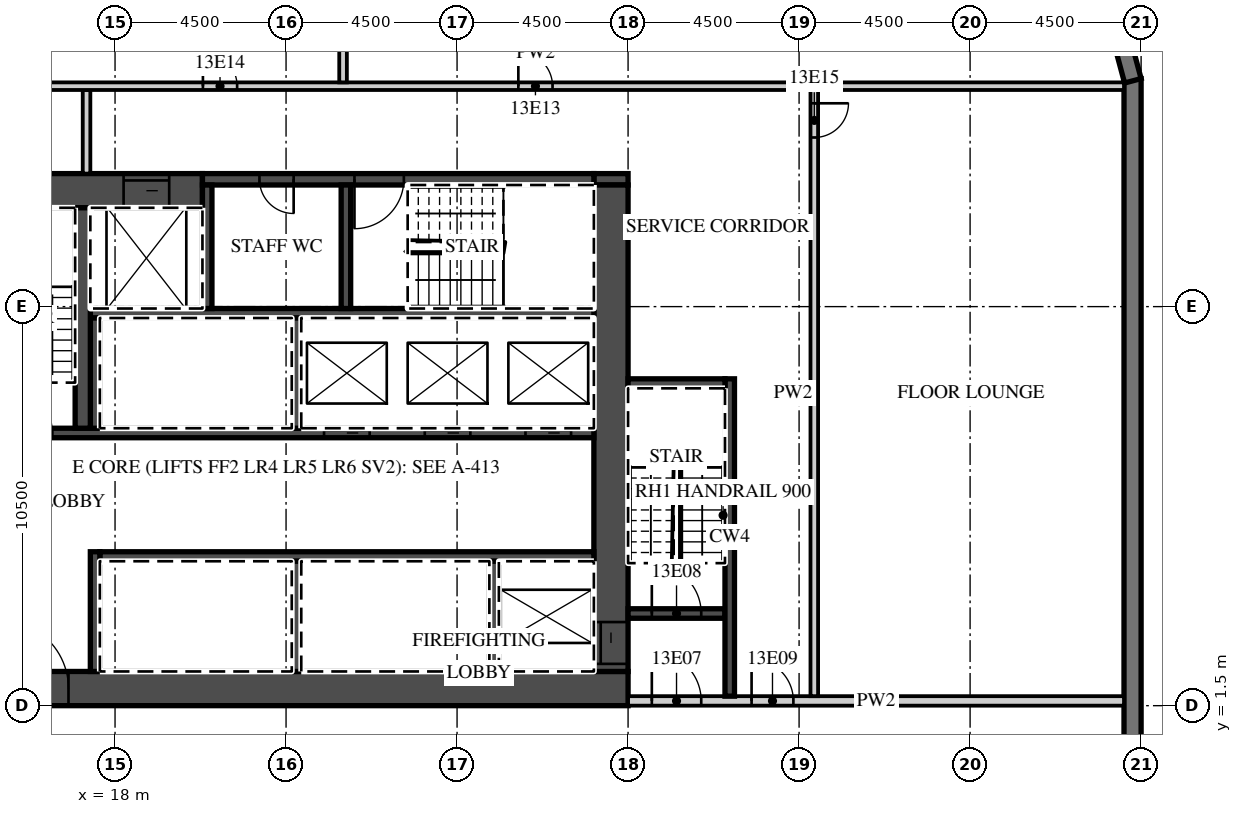
"""IFC4 building model, lengths in metres.
Left out: names, types, materials, properties, quantities, classifications, styles, units other than length and angle.
Written with IfcOpenShell. Run it as: python <this file> out.ifc"""

import sys

from ifc_helpers import new_model, si_unit, direction, frame, frame_2d, origin, place, context, subcontext, project, spatial, polyline, rectangle, outline, extrude, element, fill, save


model = new_model("IFC4")
c1 = context("Model", 3, precision=1e-05, world=origin(), true_north=direction((0.0, 1.0)))
c2 = subcontext(c1, "Body", "Model", "MODEL_VIEW")
j1 = project(units=[si_unit("LENGTHUNIT", "METRE"), si_unit("PLANEANGLEUNIT", "RADIAN")], contexts=[c1])
p1 = place(None, origin())
s1 = spatial("IfcSite", under=j1, at=p1, CompositionType="ELEMENT")
p2 = place(p1, origin())
s2 = spatial("IfcBuilding", under=s1, at=p2, CompositionType="ELEMENT")
p3 = place(p2, frame((0.0, 0.0, 73.2)))
s3 = spatial("IfcBuildingStorey", under=s2, at=p3, CompositionType="ELEMENT", Elevation=73.2)
p4 = place(p3, frame((44.775, -18.0, 0.0), z_axis=(0.0, 0.0, 1.0), x_axis=(0.0, 1.0, 0.0)))
e1 = element("IfcWall", 1, at=p4, inside=s3, PredefinedType="SOLIDWALL", context=c2, shape_type="SweptSolid", body=[
    extrude(rectangle(XDim=36.0, YDim=0.45, at=frame_2d((18.0, 0.0))), origin(), (0.0, 0.0, 1.0), 3.02),
])
p5 = place(p4, frame((3.9, 0.0, 0.45)))
e2 = element("IfcOpeningElement", 2, at=p5, cuts=e1, PredefinedType="OPENING", context=c2, shape_type="SweptSolid", body=[
    extrude(rectangle(XDim=3.3, YDim=2.25, at=frame_2d((1.65, 1.125))), frame((0.0, 0.235, 0.0), z_axis=(0.0, -1.0, 0.0), x_axis=(1.0, 0.0, 0.0)), (0.0, 0.0, 1.0), 0.47),
])
p6 = place(p4, frame((8.4, 0.0, 0.45)))
e3 = element("IfcOpeningElement", 3, at=p6, cuts=e1, PredefinedType="OPENING", context=c2, shape_type="SweptSolid", body=[
    extrude(rectangle(XDim=3.3, YDim=2.25, at=frame_2d((1.65, 1.125))), frame((0.0, 0.235, 0.0), z_axis=(0.0, -1.0, 0.0), x_axis=(1.0, 0.0, 0.0)), (0.0, 0.0, 1.0), 0.47),
])
p7 = place(p4, frame((12.9, 0.0, 0.45)))
e4 = element("IfcOpeningElement", 4, at=p7, cuts=e1, PredefinedType="OPENING", context=c2, shape_type="SweptSolid", body=[
    extrude(rectangle(XDim=3.3, YDim=2.25, at=frame_2d((1.65, 1.125))), frame((0.0, 0.235, 0.0), z_axis=(0.0, -1.0, 0.0), x_axis=(1.0, 0.0, 0.0)), (0.0, 0.0, 1.0), 0.47),
])
p8 = place(p3, frame((44.783, 17.942, 0.0), z_axis=(0.0, 0.0, 1.0), x_axis=(-0.25881466832, 0.965926999034, 0.0)))
e5 = element("IfcWall", 5, at=p8, inside=s3, PredefinedType="SOLIDWALL", context=c2, shape_type="SweptSolid", body=[
    extrude(outline(polyline([(0.0, -0.225), (2.071, -0.225), (1.95, 0.225), (0.121, 0.225), (0.0, -0.225)])), origin(), (0.0, 0.0, 1.0), 3.02),
])
p9 = place(p3, frame((13.5, 1.95, 0.0), z_axis=(0.0, 0.0, 1.0), x_axis=(1.0, 0.0, 0.0)))
e6 = element("IfcWall", 6, at=p9, inside=s3, PredefinedType="SHEAR", context=c2, shape_type="SweptSolid", body=[
    extrude(rectangle(XDim=18.0, YDim=0.9, at=frame_2d((9.0, 0.0))), origin(), (0.0, 0.0, 1.0), 3.02),
])
p10 = place(p9, frame((1.475, 0.0, 0.0)))
e7 = element("IfcOpeningElement", 7, at=p10, cuts=e6, PredefinedType="OPENING", context=c2, shape_type="SweptSolid", body=[
    extrude(rectangle(XDim=1.8, YDim=2.1, at=frame_2d((0.9, 1.05))), frame((0.0, 0.46, 0.0), z_axis=(0.0, -1.0, 0.0), x_axis=(1.0, 0.0, 0.0)), (0.0, 0.0, 1.0), 0.92),
])
p11 = place(p3, frame((13.5, 15.05, 0.0), z_axis=(0.0, 0.0, 1.0), x_axis=(1.0, 0.0, 0.0)))
e8 = element("IfcWall", 8, at=p11, inside=s3, PredefinedType="SHEAR", context=c2, shape_type="SweptSolid", body=[
    extrude(rectangle(XDim=6.8, YDim=0.9, at=frame_2d((3.4, 0.0))), origin(), (0.0, 0.0, 1.0), 3.02),
])
p12 = place(p11, frame((4.725, 0.0, 0.0)))
e9 = element("IfcOpeningElement", 9, at=p12, cuts=e8, PredefinedType="OPENING", context=c2, shape_type="SweptSolid", body=[
    extrude(rectangle(XDim=1.2, YDim=2.1, at=frame_2d((0.6, 1.05))), frame((0.0, 0.46, 0.0), z_axis=(0.0, -1.0, 0.0), x_axis=(1.0, 0.0, 0.0)), (0.0, 0.0, 1.0), 0.92),
])
p13 = place(p3, frame((30.6, 15.35, 0.0), z_axis=(0.0, 0.0, 1.0), x_axis=(1.0, 0.0, 0.0)))
e10 = element("IfcWall", 10, at=p13, inside=s3, PredefinedType="SHEAR", context=c2, shape_type="SweptSolid", body=[
    extrude(rectangle(XDim=0.9, YDim=0.3, at=frame_2d((0.45, 0.0))), origin(), (0.0, 0.0, 1.0), 3.02),
])
p14 = place(p3, frame((20.3, 15.35, 0.0), z_axis=(0.0, 0.0, 1.0), x_axis=(1.0, 0.0, 0.0)))
e11 = element("IfcWall", 11, at=p14, inside=s3, PredefinedType="SHEAR", context=c2, shape_type="SweptSolid", body=[
    extrude(rectangle(XDim=10.3, YDim=0.3, at=frame_2d((5.15, 0.0))), origin(), (0.0, 0.0, 1.0), 3.02),
])
p15 = place(p14, frame((4.0, 0.0, 0.0)))
e12 = element("IfcOpeningElement", 12, at=p15, cuts=e11, PredefinedType="OPENING", context=c2, shape_type="SweptSolid", body=[
    extrude(rectangle(XDim=1.3, YDim=2.1, at=frame_2d((0.65, 1.05))), frame((0.0, 0.16, 0.0), z_axis=(0.0, -1.0, 0.0), x_axis=(1.0, 0.0, 0.0)), (0.0, 0.0, 1.0), 0.32),
])
p16 = place(p14, frame((1.5, 0.0, 0.0)))
e13 = element("IfcOpeningElement", 13, at=p16, cuts=e11, PredefinedType="OPENING", context=c2, shape_type="SweptSolid", body=[
    extrude(rectangle(XDim=0.9, YDim=2.1, at=frame_2d((0.45, 1.05))), frame((0.0, 0.16, 0.0), z_axis=(0.0, -1.0, 0.0), x_axis=(1.0, 0.0, 0.0)), (0.0, 0.0, 1.0), 0.32),
])
p17 = place(p3, frame((31.05, 2.4, 0.0), z_axis=(0.0, 0.0, 1.0), x_axis=(0.0, 1.0, 0.0)))
e14 = element("IfcWall", 14, at=p17, inside=s3, PredefinedType="SHEAR", context=c2, shape_type="SweptSolid", body=[
    extrude(rectangle(XDim=12.8, YDim=0.9, at=frame_2d((6.4, 0.0))), origin(), (0.0, 0.0, 1.0), 3.02),
])
p18 = place(p17, frame((0.2, 0.0, 0.0)))
e15 = element("IfcOpeningElement", 15, at=p18, cuts=e14, PredefinedType="OPENING", context=c2, shape_type="SweptSolid", body=[
    extrude(rectangle(XDim=1.1, YDim=2.1, at=frame_2d((0.55, 1.05))), frame((0.0, 0.46, 0.0), z_axis=(0.0, -1.0, 0.0), x_axis=(1.0, 0.0, 0.0)), (0.0, 0.0, 1.0), 0.92),
])
p19 = place(p3, frame((17.6, 5.425, 0.0), z_axis=(0.0, 0.0, 1.0), x_axis=(1.0, 0.0, 0.0)))
e16 = element("IfcWall", 16, at=p19, inside=s3, PredefinedType="SHEAR", context=c2, shape_type="SweptSolid", body=[
    extrude(rectangle(XDim=13.0, YDim=0.25, at=frame_2d((6.5, 0.0))), origin(), (0.0, 0.0, 1.0), 3.02),
])
p20 = place(p3, frame((17.475, 2.4, 0.0), z_axis=(0.0, 0.0, 1.0), x_axis=(0.0, 1.0, 0.0)))
e17 = element("IfcWall", 17, at=p20, inside=s3, PredefinedType="SHEAR", context=c2, shape_type="SweptSolid", body=[
    extrude(rectangle(XDim=3.15, YDim=0.25, at=frame_2d((1.575, 0.0))), origin(), (0.0, 0.0, 1.0), 3.02),
])
for number, where, z_axis, x_axis in (
    (18, (27.975, 2.4, 0.0), (0.0, 0.0, 1.0), (0.0, 1.0, 0.0)),
    (19, (22.775, 2.4, 0.0), (0.0, 0.0, 1.0), (0.0, 1.0, 0.0)),
):
    element("IfcWall", number, at=place(p3, frame(where, z_axis=z_axis, x_axis=x_axis)), inside=s3, PredefinedType="SHEAR", context=c2, shape_type="SweptSolid", body=[
        extrude(rectangle(XDim=2.9, YDim=0.25, at=frame_2d((1.45, 0.0))), origin(), (0.0, 0.0, 1.0), 3.02),
    ])
p21 = place(p3, frame((14.4, 8.675, 0.0), z_axis=(0.0, 0.0, 1.0), x_axis=(1.0, 0.0, 0.0)))
e20 = element("IfcWall", 20, at=p21, inside=s3, PredefinedType="SHEAR", context=c2, shape_type="SweptSolid", body=[
    extrude(rectangle(XDim=16.2, YDim=0.25, at=frame_2d((8.1, 0.0))), origin(), (0.0, 0.0, 1.0), 3.02),
])
p22 = place(p21, frame((14.4, 0.0, 0.0)))
e21 = element("IfcOpeningElement", 21, at=p22, cuts=e20, PredefinedType="OPENING", context=c2, shape_type="SweptSolid", body=[
    extrude(rectangle(XDim=1.2, YDim=2.1, at=frame_2d((0.6, 1.05))), frame((0.0, 0.135, 0.0), z_axis=(0.0, -1.0, 0.0), x_axis=(1.0, 0.0, 0.0)), (0.0, 0.0, 1.0), 0.27),
])
p23 = place(p21, frame((11.75, 0.0, 0.0)))
e22 = element("IfcOpeningElement", 22, at=p23, cuts=e20, PredefinedType="OPENING", context=c2, shape_type="SweptSolid", body=[
    extrude(rectangle(XDim=1.2, YDim=2.1, at=frame_2d((0.6, 1.05))), frame((0.0, 0.135, 0.0), z_axis=(0.0, -1.0, 0.0), x_axis=(1.0, 0.0, 0.0)), (0.0, 0.0, 1.0), 0.27),
])
p24 = place(p21, frame((9.1, 0.0, 0.0)))
e23 = element("IfcOpeningElement", 23, at=p24, cuts=e20, PredefinedType="OPENING", context=c2, shape_type="SweptSolid", body=[
    extrude(rectangle(XDim=1.2, YDim=2.1, at=frame_2d((0.6, 1.05))), frame((0.0, 0.135, 0.0), z_axis=(0.0, -1.0, 0.0), x_axis=(1.0, 0.0, 0.0)), (0.0, 0.0, 1.0), 0.27),
])
p25 = place(p21, frame((0.65, 0.0, 0.0)))
e24 = element("IfcOpeningElement", 24, at=p25, cuts=e20, PredefinedType="OPENING", context=c2, shape_type="SweptSolid", body=[
    extrude(rectangle(XDim=1.3, YDim=2.1, at=frame_2d((0.65, 1.05))), frame((0.0, 0.135, 0.0), z_axis=(0.0, -1.0, 0.0), x_axis=(1.0, 0.0, 0.0)), (0.0, 0.0, 1.0), 0.27),
])
p26 = place(p3, frame((17.35, 11.825, 0.0), z_axis=(0.0, 0.0, 1.0), x_axis=(1.0, 0.0, 0.0)))
e25 = element("IfcWall", 25, at=p26, inside=s3, PredefinedType="SHEAR", context=c2, shape_type="SweptSolid", body=[
    extrude(rectangle(XDim=13.25, YDim=0.25, at=frame_2d((6.625, 0.0))), origin(), (0.0, 0.0, 1.0), 3.02),
])
for number, where, z_axis, x_axis in (
    (26, (17.475, 8.8, 0.0), (0.0, 0.0, 1.0), (0.0, 1.0, 0.0)),
    (27, (22.775, 8.8, 0.0), (0.0, 0.0, 1.0), (0.0, 1.0, 0.0)),
):
    element("IfcWall", number, at=place(p3, frame(where, z_axis=z_axis, x_axis=x_axis)), inside=s3, PredefinedType="SHEAR", context=c2, shape_type="SweptSolid", body=[
        extrude(rectangle(XDim=2.9, YDim=0.25, at=frame_2d((1.45, 0.0))), origin(), (0.0, 0.0, 1.0), 3.02),
    ])
p27 = place(p3, frame((17.15, 8.8, 0.0), z_axis=(0.0, 0.0, 1.0), x_axis=(0.0, 1.0, 0.0)))
e28 = element("IfcWall", 28, at=p27, inside=s3, PredefinedType="SHEAR", context=c2, shape_type="SweptSolid", body=[
    extrude(rectangle(XDim=5.8, YDim=0.4, at=frame_2d((2.9, 0.0))), origin(), (0.0, 0.0, 1.0), 3.02),
])
for number, where, z_axis, x_axis in (
    (29, (20.425, 11.95, 0.0), (0.0, 0.0, 1.0), (0.0, 1.0, 0.0)),
    (30, (24.075, 11.95, 0.0), (0.0, 0.0, 1.0), (0.0, 1.0, 0.0)),
):
    element("IfcWall", number, at=place(p3, frame(where, z_axis=z_axis, x_axis=x_axis)), inside=s3, PredefinedType="SHEAR", context=c2, shape_type="SweptSolid", body=[
        extrude(rectangle(XDim=3.25, YDim=0.25, at=frame_2d((1.625, 0.0))), origin(), (0.0, 0.0, 1.0), 3.02),
    ])
p28 = place(p3, frame((31.5, 1.625, 0.0), z_axis=(0.0, 0.0, 1.0), x_axis=(1.0, 0.0, 0.0)))
e31 = element("IfcWall", 31, at=p28, inside=s3, PredefinedType="PARTITIONING", context=c2, shape_type="SweptSolid", body=[
    extrude(rectangle(XDim=13.05, YDim=0.25, at=frame_2d((6.525, 0.0))), origin(), (0.0, 0.0, 1.0), 3.02),
])
p29 = place(p28, frame((0.625, 0.0, 0.0)))
e32 = element("IfcOpeningElement", 32, at=p29, cuts=e31, PredefinedType="OPENING", context=c2, shape_type="SweptSolid", body=[
    extrude(rectangle(XDim=1.3, YDim=2.1, at=frame_2d((0.65, 1.05))), frame((0.0, 0.135, 0.0), z_axis=(0.0, -1.0, 0.0), x_axis=(1.0, 0.0, 0.0)), (0.0, 0.0, 1.0), 0.27),
])
p30 = place(p28, frame((3.25, 0.0, 0.0)))
e33 = element("IfcOpeningElement", 33, at=p30, cuts=e31, PredefinedType="OPENING", context=c2, shape_type="SweptSolid", body=[
    extrude(rectangle(XDim=1.1, YDim=2.1, at=frame_2d((0.55, 1.05))), frame((0.0, 0.135, 0.0), z_axis=(0.0, -1.0, 0.0), x_axis=(1.0, 0.0, 0.0)), (0.0, 0.0, 1.0), 0.27),
])
p31 = place(p3, frame((31.5, 3.925, 0.0), z_axis=(0.0, 0.0, 1.0), x_axis=(1.0, 0.0, 0.0)))
e34 = element("IfcWall", 34, at=p31, inside=s3, PredefinedType="SHEAR", context=c2, shape_type="SweptSolid", body=[
    extrude(rectangle(XDim=2.55, YDim=0.25, at=frame_2d((1.275, 0.0))), origin(), (0.0, 0.0, 1.0), 3.02),
])
p32 = place(p31, frame((0.625, 0.0, 0.0)))
e35 = element("IfcOpeningElement", 35, at=p32, cuts=e34, PredefinedType="OPENING", context=c2, shape_type="SweptSolid", body=[
    extrude(rectangle(XDim=1.3, YDim=2.1, at=frame_2d((0.65, 1.05))), frame((0.0, 0.135, 0.0), z_axis=(0.0, -1.0, 0.0), x_axis=(1.0, 0.0, 0.0)), (0.0, 0.0, 1.0), 0.27),
])
p33 = place(p3, frame((34.175, 1.75, 0.0), z_axis=(0.0, 0.0, 1.0), x_axis=(0.0, 1.0, 0.0)))
e36 = element("IfcWall", 36, at=p33, inside=s3, PredefinedType="SHEAR", context=c2, shape_type="SweptSolid", body=[
    extrude(rectangle(XDim=8.35, YDim=0.25, at=frame_2d((4.175, 0.0))), origin(), (0.0, 0.0, 1.0), 3.02),
])
p34 = place(p3, frame((31.5, 9.975, 0.0), z_axis=(0.0, 0.0, 1.0), x_axis=(1.0, 0.0, 0.0)))
e37 = element("IfcWall", 37, at=p34, inside=s3, PredefinedType="SHEAR", context=c2, shape_type="SweptSolid", body=[
    extrude(rectangle(XDim=2.55, YDim=0.25, at=frame_2d((1.275, 0.0))), origin(), (0.0, 0.0, 1.0), 3.02),
])
p35 = place(p3, frame((17.25, 15.5, 0.0), z_axis=(0.0, 0.0, 1.0), x_axis=(0.0, 1.0, 0.0)))
e38 = element("IfcWall", 38, at=p35, inside=s3, PredefinedType="PARTITIONING", context=c2, shape_type="SweptSolid", body=[
    extrude(rectangle(XDim=2.2, YDim=0.2, at=frame_2d((1.1, 0.0))), origin(), (0.0, 0.0, 1.0), 3.02),
])
p36 = place(p3, frame((36.4, 1.75, 0.0), z_axis=(0.0, 0.0, 1.0), x_axis=(0.0, 1.0, 0.0)))
e39 = element("IfcWall", 39, at=p36, inside=s3, PredefinedType="PARTITIONING", context=c2, shape_type="SweptSolid", body=[
    extrude(rectangle(XDim=15.95, YDim=0.2, at=frame_2d((7.975, 0.0))), origin(), (0.0, 0.0, 1.0), 3.02),
])
p37 = place(p36, frame((14.7, 0.0, 0.0)))
e40 = element("IfcOpeningElement", 40, at=p37, cuts=e39, PredefinedType="OPENING", context=c2, shape_type="SweptSolid", body=[
    extrude(rectangle(XDim=0.9, YDim=2.1, at=frame_2d((0.45, 1.05))), frame((0.0, 0.11, 0.0), z_axis=(0.0, -1.0, 0.0), x_axis=(1.0, 0.0, 0.0)), (0.0, 0.0, 1.0), 0.22),
])
p38 = place(p3, frame((13.6, 17.8, 0.0), z_axis=(0.0, 0.0, 1.0), x_axis=(1.0, 0.0, 0.0)))
e41 = element("IfcWall", 41, at=p38, inside=s3, PredefinedType="PARTITIONING", context=c2, shape_type="SweptSolid", body=[
    extrude(rectangle(XDim=30.95, YDim=0.2, at=frame_2d((15.475, 0.0))), origin(), (0.0, 0.0, 1.0), 3.02),
])
p39 = place(p38, frame((15.012, 0.0, 0.0)))
e42 = element("IfcOpeningElement", 42, at=p39, cuts=e41, PredefinedType="OPENING", context=c2, shape_type="SweptSolid", body=[
    extrude(rectangle(XDim=0.9, YDim=2.1, at=frame_2d((0.45, 1.05))), frame((0.0, 0.11, 0.0), z_axis=(0.0, -1.0, 0.0), x_axis=(1.0, 0.0, 0.0)), (0.0, 0.0, 1.0), 0.22),
])
p40 = place(p38, frame((6.712, 0.0, 0.0)))
e43 = element("IfcOpeningElement", 43, at=p40, cuts=e41, PredefinedType="OPENING", context=c2, shape_type="SweptSolid", body=[
    extrude(rectangle(XDim=0.9, YDim=2.1, at=frame_2d((0.45, 1.05))), frame((0.0, 0.11, 0.0), z_axis=(0.0, -1.0, 0.0), x_axis=(1.0, 0.0, 0.0)), (0.0, 0.0, 1.0), 0.22),
])
p41 = place(p3, frame((24.0, 17.9, 0.0), z_axis=(0.0, 0.0, 1.0), x_axis=(0.0, 1.0, 0.0)))
e44 = element("IfcWall", 44, at=p41, inside=s3, PredefinedType="PARTITIONING", context=c2, shape_type="SweptSolid", body=[
    extrude(rectangle(XDim=3.65, YDim=0.2, at=frame_2d((1.825, 0.0))), origin(), (0.0, 0.0, 1.0), 3.02),
])
p42 = place(p22, origin())
e45 = element("IfcDoor", 45, at=p42, inside=s3, OperationType="SLIDING_TO_LEFT", PredefinedType="DOOR", context=c2, shape_type="SweptSolid", body=[
    extrude(rectangle(XDim=1.2, YDim=2.1, at=frame_2d((0.6, 1.05))), frame((0.0, 0.025, 0.0), z_axis=(0.0, -1.0, 0.0), x_axis=(1.0, 0.0, 0.0)), (0.0, 0.0, 1.0), 0.05),
])
fill(e21, e45)
p43 = place(p23, origin())
e46 = element("IfcDoor", 46, at=p43, inside=s3, OperationType="SLIDING_TO_RIGHT", PredefinedType="DOOR", context=c2, shape_type="SweptSolid", body=[
    extrude(rectangle(XDim=1.2, YDim=2.1, at=frame_2d((0.6, 1.05))), frame((0.0, 0.025, 0.0), z_axis=(0.0, -1.0, 0.0), x_axis=(1.0, 0.0, 0.0)), (0.0, 0.0, 1.0), 0.05),
])
fill(e22, e46)
p44 = place(p24, origin())
e47 = element("IfcDoor", 47, at=p44, inside=s3, OperationType="SLIDING_TO_RIGHT", PredefinedType="DOOR", context=c2, shape_type="SweptSolid", body=[
    extrude(rectangle(XDim=1.2, YDim=2.1, at=frame_2d((0.6, 1.05))), frame((0.0, 0.025, 0.0), z_axis=(0.0, -1.0, 0.0), x_axis=(1.0, 0.0, 0.0)), (0.0, 0.0, 1.0), 0.05),
])
fill(e23, e47)
p45 = place(p12, origin())
e48 = element("IfcDoor", 48, at=p45, inside=s3, OperationType="SLIDING_TO_LEFT", PredefinedType="DOOR", context=c2, shape_type="SweptSolid", body=[
    extrude(rectangle(XDim=1.2, YDim=2.1, at=frame_2d((0.6, 1.05))), frame((0.0, 0.025, 0.0), z_axis=(0.0, -1.0, 0.0), x_axis=(1.0, 0.0, 0.0)), (0.0, 0.0, 1.0), 0.05),
])
fill(e9, e48)
p46 = place(p18, origin())
e49 = element("IfcDoor", 49, at=p46, inside=s3, OperationType="SLIDING_TO_LEFT", PredefinedType="DOOR", context=c2, shape_type="SweptSolid", body=[
    extrude(rectangle(XDim=1.1, YDim=2.1, at=frame_2d((0.55, 1.05))), frame((0.0, 0.025, 0.0), z_axis=(0.0, -1.0, 0.0), x_axis=(1.0, 0.0, 0.0)), (0.0, 0.0, 1.0), 0.05),
])
fill(e15, e49)
p47 = place(p10, origin())
e50 = element("IfcDoor", 50, at=p47, inside=s3, OperationType="DOUBLE_DOOR_DOUBLE_SWING", PredefinedType="DOOR", context=c2, shape_type="SweptSolid", body=[
    extrude(rectangle(XDim=1.8, YDim=2.1, at=frame_2d((0.9, 1.05))), frame((0.0, 0.025, 0.0), z_axis=(0.0, -1.0, 0.0), x_axis=(1.0, 0.0, 0.0)), (0.0, 0.0, 1.0), 0.05),
])
fill(e7, e50)
p48 = place(p29, origin())
e51 = element("IfcDoor", 51, at=p48, inside=s3, OperationType="SINGLE_SWING_LEFT", PredefinedType="DOOR", context=c2, shape_type="SweptSolid", body=[
    extrude(rectangle(XDim=1.3, YDim=2.1, at=frame_2d((0.65, 1.05))), frame((0.0, 0.025, 0.0), z_axis=(0.0, -1.0, 0.0), x_axis=(1.0, 0.0, 0.0)), (0.0, 0.0, 1.0), 0.05),
])
fill(e32, e51)
p49 = place(p32, origin())
e52 = element("IfcDoor", 52, at=p49, inside=s3, OperationType="SINGLE_SWING_LEFT", PredefinedType="DOOR", context=c2, shape_type="SweptSolid", body=[
    extrude(rectangle(XDim=1.3, YDim=2.1, at=frame_2d((0.65, 1.05))), frame((0.0, 0.025, 0.0), z_axis=(0.0, -1.0, 0.0), x_axis=(1.0, 0.0, 0.0)), (0.0, 0.0, 1.0), 0.05),
])
fill(e35, e52)
p50 = place(p30, origin())
e53 = element("IfcDoor", 53, at=p50, inside=s3, OperationType="SINGLE_SWING_LEFT", PredefinedType="DOOR", context=c2, shape_type="SweptSolid", body=[
    extrude(rectangle(XDim=1.1, YDim=2.1, at=frame_2d((0.55, 1.05))), frame((0.0, 0.025, 0.0), z_axis=(0.0, -1.0, 0.0), x_axis=(1.0, 0.0, 0.0)), (0.0, 0.0, 1.0), 0.05),
])
fill(e33, e53)
p51 = place(p15, origin())
e54 = element("IfcDoor", 54, at=p51, inside=s3, OperationType="SINGLE_SWING_LEFT", PredefinedType="DOOR", context=c2, shape_type="SweptSolid", body=[
    extrude(rectangle(XDim=1.3, YDim=2.1, at=frame_2d((0.65, 1.05))), frame((0.0, 0.025, 0.0), z_axis=(0.0, -1.0, 0.0), x_axis=(1.0, 0.0, 0.0)), (0.0, 0.0, 1.0), 0.05),
])
fill(e12, e54)
p52 = place(p16, origin())
e55 = element("IfcDoor", 55, at=p52, inside=s3, OperationType="SINGLE_SWING_RIGHT", PredefinedType="DOOR", context=c2, shape_type="SweptSolid", body=[
    extrude(rectangle(XDim=0.9, YDim=2.1, at=frame_2d((0.45, 1.05))), frame((0.0, 0.025, 0.0), z_axis=(0.0, -1.0, 0.0), x_axis=(1.0, 0.0, 0.0)), (0.0, 0.0, 1.0), 0.05),
])
fill(e13, e55)
p53 = place(p39, origin())
e56 = element("IfcDoor", 56, at=p53, inside=s3, OperationType="SINGLE_SWING_LEFT", PredefinedType="DOOR", context=c2, shape_type="SweptSolid", body=[
    extrude(rectangle(XDim=0.9, YDim=2.1, at=frame_2d((0.45, 1.05))), frame((0.0, 0.025, 0.0), z_axis=(0.0, -1.0, 0.0), x_axis=(1.0, 0.0, 0.0)), (0.0, 0.0, 1.0), 0.05),
])
fill(e42, e56)
p54 = place(p40, origin())
e57 = element("IfcDoor", 57, at=p54, inside=s3, OperationType="SINGLE_SWING_LEFT", PredefinedType="DOOR", context=c2, shape_type="SweptSolid", body=[
    extrude(rectangle(XDim=0.9, YDim=2.1, at=frame_2d((0.45, 1.05))), frame((0.0, 0.025, 0.0), z_axis=(0.0, -1.0, 0.0), x_axis=(1.0, 0.0, 0.0)), (0.0, 0.0, 1.0), 0.05),
])
fill(e43, e57)
p55 = place(p37, origin())
e58 = element("IfcDoor", 58, at=p55, inside=s3, OperationType="SINGLE_SWING_RIGHT", PredefinedType="DOOR", context=c2, shape_type="SweptSolid", body=[
    extrude(rectangle(XDim=0.9, YDim=2.1, at=frame_2d((0.45, 1.05))), frame((0.0, 0.025, 0.0), z_axis=(0.0, -1.0, 0.0), x_axis=(1.0, 0.0, 0.0)), (0.0, 0.0, 1.0), 0.05),
])
fill(e40, e58)
save(model, sys.argv[1])
